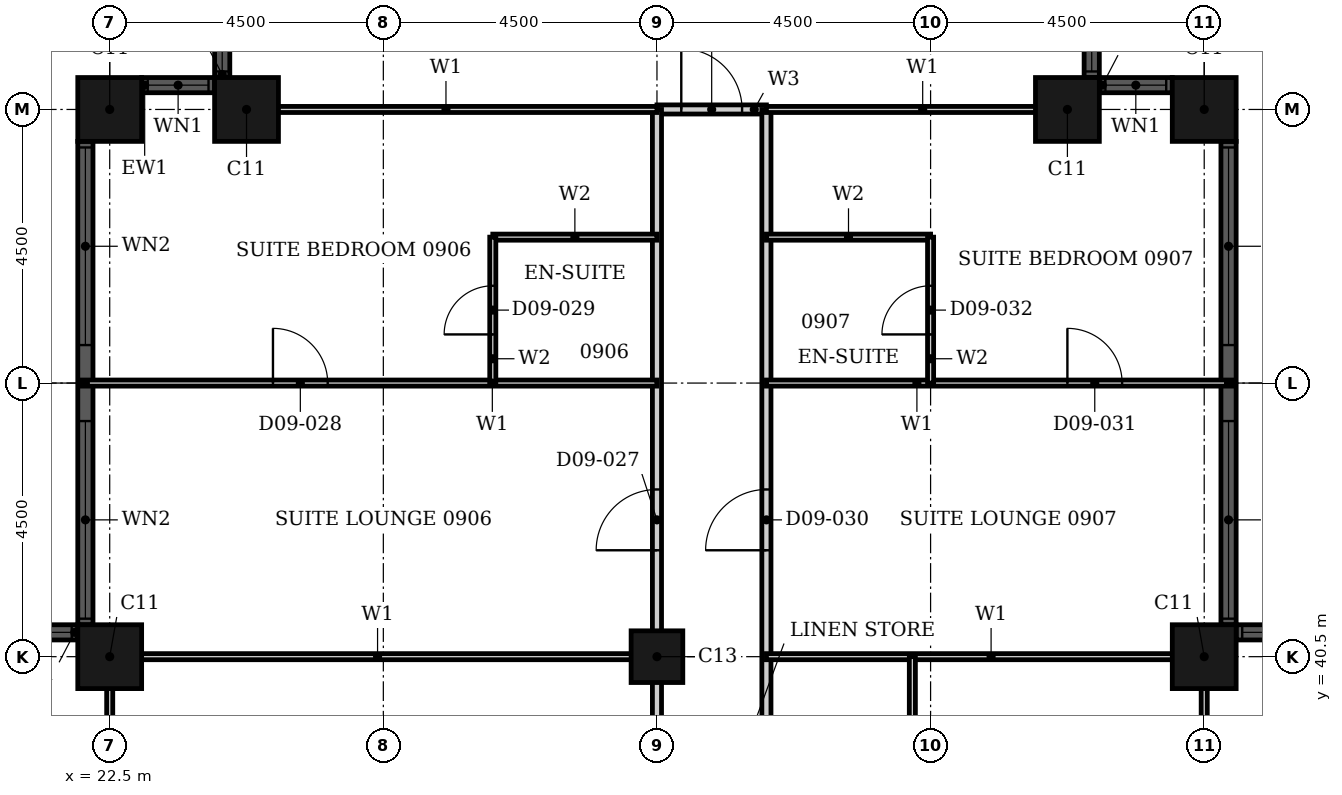
"""IFC4 building model, lengths in metres.
Left out: names, types, materials, properties, quantities, classifications, styles, units other than length and angle.
Written with IfcOpenShell. Run it as: python <this file> out.ifc"""

import sys

from ifc_helpers import new_model, si_unit, direction, frame, frame_2d, origin, origin_2d, place, context, subcontext, project, spatial, rectangle, hollow_rectangle, extrude, element, fill, save


model = new_model("IFC4")
c1 = context("Model", 3, precision=1e-05, world=origin(), true_north=direction((0.0, 1.0)))
c2 = subcontext(c1, "Body", "Model", "MODEL_VIEW")
j1 = project(units=[si_unit("LENGTHUNIT", "METRE"), si_unit("PLANEANGLEUNIT", "RADIAN")], contexts=[c1])
p1 = place(None, origin())
s1 = spatial("IfcSite", under=j1, at=p1, CompositionType="ELEMENT")
p2 = place(p1, origin())
s2 = spatial("IfcBuilding", under=s1, at=p2, CompositionType="ELEMENT")
p3 = place(p2, frame((0.0, 0.0, 44.4)))
s3 = spatial("IfcBuildingStorey", under=s2, at=p3, CompositionType="ELEMENT", Elevation=44.4)
for number, where, z_axis, x_axis in (
    (1, (40.5, 40.5, 0.0), (0.0, 0.0, 1.0), (1.0, 0.0, 0.0)),
    (2, (40.5, 49.5, 0.0), (0.0, 0.0, 1.0), (1.0, 0.0, 0.0)),
    (3, (38.25, 49.5, 0.0), (0.0, 0.0, 1.0), (1.0, 0.0, 0.0)),
    (4, (24.75, 49.5, 0.0), (0.0, 0.0, 1.0), (1.0, 0.0, 0.0)),
    (5, (22.5, 49.5, 0.0), (0.0, 0.0, 1.0), (1.0, 0.0, 0.0)),
    (6, (22.5, 40.5, 0.0), (0.0, 0.0, 1.0), (1.0, 0.0, 0.0)),
):
    element("IfcColumn", number, at=place(p3, frame(where, z_axis=z_axis, x_axis=x_axis)), inside=s3, PredefinedType="COLUMN", context=c2, shape_type="SweptSolid", body=[
        extrude(hollow_rectangle(XDim=1.05, YDim=1.05, WallThickness=0.034, at=origin_2d()), origin(), (0.0, 0.0, 1.0), 3.6),
    ])
p4 = place(p3, frame((31.5, 40.5, 0.0), z_axis=(0.0, 0.0, 1.0), x_axis=(1.0, 0.0, 0.0)))
e7 = element("IfcColumn", 7, at=p4, inside=s3, PredefinedType="COLUMN", context=c2, shape_type="SweptSolid", body=[
    extrude(hollow_rectangle(XDim=0.85, YDim=0.85, WallThickness=0.026, at=origin_2d()), origin(), (0.0, 0.0, 1.0), 3.6),
])
p5 = place(p3, frame((44.475, 40.9, 0.0), z_axis=(0.0, 0.0, 1.0), x_axis=(-1.0, 0.0, 0.0)))
e8 = element("IfcWall", 8, at=p5, inside=s3, PredefinedType="SOLIDWALL", context=c2, shape_type="SweptSolid", body=[
    extrude(rectangle(XDim=3.45, YDim=0.25, at=frame_2d((1.725, 0.0))), origin(), (0.0, 0.0, 1.0), 3.6),
])
p6 = place(p5, frame((0.1, 0.0, 0.9)))
e9 = element("IfcOpeningElement", 9, at=p6, cuts=e8, PredefinedType="OPENING", context=c2, shape_type="SweptSolid", body=[
    extrude(rectangle(XDim=3.25, YDim=2.08, at=frame_2d((1.625, 1.04))), frame((0.0, 0.135, 0.0), z_axis=(0.0, -1.0, 0.0), x_axis=(1.0, 0.0, 0.0)), (0.0, 0.0, 1.0), 0.27),
])
p7 = place(p3, frame((40.9, 41.025, 0.0), z_axis=(0.0, 0.0, 1.0), x_axis=(0.0, 1.0, 0.0)))
e10 = element("IfcWall", 10, at=p7, inside=s3, PredefinedType="SOLIDWALL", context=c2, shape_type="SweptSolid", body=[
    extrude(rectangle(XDim=7.95, YDim=0.25, at=frame_2d((3.975, 0.0))), origin(), (0.0, 0.0, 1.0), 3.6),
])
p8 = place(p7, frame((0.1, 0.0, 0.9)))
e11 = element("IfcOpeningElement", 11, at=p8, cuts=e10, PredefinedType="OPENING", context=c2, shape_type="SweptSolid", body=[
    extrude(rectangle(XDim=3.25, YDim=2.08, at=frame_2d((1.625, 1.04))), frame((0.0, 0.135, 0.0), z_axis=(0.0, -1.0, 0.0), x_axis=(1.0, 0.0, 0.0)), (0.0, 0.0, 1.0), 0.27),
])
p9 = place(p7, frame((4.6, 0.0, 0.9)))
e12 = element("IfcOpeningElement", 12, at=p9, cuts=e10, PredefinedType="OPENING", context=c2, shape_type="SweptSolid", body=[
    extrude(rectangle(XDim=3.25, YDim=2.08, at=frame_2d((1.625, 1.04))), frame((0.0, 0.135, 0.0), z_axis=(0.0, -1.0, 0.0), x_axis=(1.0, 0.0, 0.0)), (0.0, 0.0, 1.0), 0.27),
])
p10 = place(p3, frame((39.975, 49.9, 0.0), z_axis=(0.0, 0.0, 1.0), x_axis=(-1.0, 0.0, 0.0)))
e13 = element("IfcWall", 13, at=p10, inside=s3, PredefinedType="SOLIDWALL", context=c2, shape_type="SweptSolid", body=[
    extrude(rectangle(XDim=1.2, YDim=0.25, at=frame_2d((0.6, 0.0))), origin(), (0.0, 0.0, 1.0), 3.6),
])
p11 = place(p10, frame((0.1, 0.0, 0.9)))
e14 = element("IfcOpeningElement", 14, at=p11, cuts=e13, PredefinedType="OPENING", context=c2, shape_type="SweptSolid", body=[
    extrude(rectangle(XDim=1.0, YDim=2.08, at=frame_2d((0.5, 1.04))), frame((0.0, 0.135, 0.0), z_axis=(0.0, -1.0, 0.0), x_axis=(1.0, 0.0, 0.0)), (0.0, 0.0, 1.0), 0.27),
])
p12 = place(p3, frame((38.65, 50.025, 0.0), z_axis=(0.0, 0.0, 1.0), x_axis=(0.0, 1.0, 0.0)))
e15 = element("IfcWall", 15, at=p12, inside=s3, PredefinedType="SOLIDWALL", context=c2, shape_type="SweptSolid", body=[
    extrude(rectangle(XDim=1.2, YDim=0.25, at=frame_2d((0.6, 0.0))), origin(), (0.0, 0.0, 1.0), 3.6),
])
p13 = place(p12, frame((0.1, 0.0, 0.9)))
e16 = element("IfcOpeningElement", 16, at=p13, cuts=e15, PredefinedType="OPENING", context=c2, shape_type="SweptSolid", body=[
    extrude(rectangle(XDim=1.0, YDim=2.08, at=frame_2d((0.5, 1.04))), frame((0.0, 0.135, 0.0), z_axis=(0.0, -1.0, 0.0), x_axis=(1.0, 0.0, 0.0)), (0.0, 0.0, 1.0), 0.27),
])
p14 = place(p3, frame((24.35, 51.225, 0.0), z_axis=(0.0, 0.0, 1.0), x_axis=(0.0, -1.0, 0.0)))
e17 = element("IfcWall", 17, at=p14, inside=s3, PredefinedType="SOLIDWALL", context=c2, shape_type="SweptSolid", body=[
    extrude(rectangle(XDim=1.2, YDim=0.25, at=frame_2d((0.6, 0.0))), origin(), (0.0, 0.0, 1.0), 3.6),
])
p15 = place(p14, frame((0.1, 0.0, 0.9)))
e18 = element("IfcOpeningElement", 18, at=p15, cuts=e17, PredefinedType="OPENING", context=c2, shape_type="SweptSolid", body=[
    extrude(rectangle(XDim=1.0, YDim=2.08, at=frame_2d((0.5, 1.04))), frame((0.0, 0.135, 0.0), z_axis=(0.0, -1.0, 0.0), x_axis=(1.0, 0.0, 0.0)), (0.0, 0.0, 1.0), 0.27),
])
p16 = place(p3, frame((24.225, 49.9, 0.0), z_axis=(0.0, 0.0, 1.0), x_axis=(-1.0, 0.0, 0.0)))
e19 = element("IfcWall", 19, at=p16, inside=s3, PredefinedType="SOLIDWALL", context=c2, shape_type="SweptSolid", body=[
    extrude(rectangle(XDim=1.2, YDim=0.25, at=frame_2d((0.6, 0.0))), origin(), (0.0, 0.0, 1.0), 3.6),
])
p17 = place(p16, frame((0.1, 0.0, 0.9)))
e20 = element("IfcOpeningElement", 20, at=p17, cuts=e19, PredefinedType="OPENING", context=c2, shape_type="SweptSolid", body=[
    extrude(rectangle(XDim=1.0, YDim=2.08, at=frame_2d((0.5, 1.04))), frame((0.0, 0.135, 0.0), z_axis=(0.0, -1.0, 0.0), x_axis=(1.0, 0.0, 0.0)), (0.0, 0.0, 1.0), 0.27),
])
p18 = place(p3, frame((22.1, 48.975, 0.0), z_axis=(0.0, 0.0, 1.0), x_axis=(0.0, -1.0, 0.0)))
e21 = element("IfcWall", 21, at=p18, inside=s3, PredefinedType="SOLIDWALL", context=c2, shape_type="SweptSolid", body=[
    extrude(rectangle(XDim=7.95, YDim=0.25, at=frame_2d((3.975, 0.0))), origin(), (0.0, 0.0, 1.0), 3.6),
])
p19 = place(p18, frame((0.1, 0.0, 0.9)))
e22 = element("IfcOpeningElement", 22, at=p19, cuts=e21, PredefinedType="OPENING", context=c2, shape_type="SweptSolid", body=[
    extrude(rectangle(XDim=3.25, YDim=2.08, at=frame_2d((1.625, 1.04))), frame((0.0, 0.135, 0.0), z_axis=(0.0, -1.0, 0.0), x_axis=(1.0, 0.0, 0.0)), (0.0, 0.0, 1.0), 0.27),
])
p20 = place(p18, frame((4.6, 0.0, 0.9)))
e23 = element("IfcOpeningElement", 23, at=p20, cuts=e21, PredefinedType="OPENING", context=c2, shape_type="SweptSolid", body=[
    extrude(rectangle(XDim=3.25, YDim=2.08, at=frame_2d((1.625, 1.04))), frame((0.0, 0.135, 0.0), z_axis=(0.0, -1.0, 0.0), x_axis=(1.0, 0.0, 0.0)), (0.0, 0.0, 1.0), 0.27),
])
p21 = place(p3, frame((21.975, 40.9, 0.0), z_axis=(0.0, 0.0, 1.0), x_axis=(-1.0, 0.0, 0.0)))
e24 = element("IfcWall", 24, at=p21, inside=s3, PredefinedType="SOLIDWALL", context=c2, shape_type="SweptSolid", body=[
    extrude(rectangle(XDim=3.45, YDim=0.25, at=frame_2d((1.725, 0.0))), origin(), (0.0, 0.0, 1.0), 3.6),
])
p22 = place(p21, frame((0.1, 0.0, 0.9)))
e25 = element("IfcOpeningElement", 25, at=p22, cuts=e24, PredefinedType="OPENING", context=c2, shape_type="SweptSolid", body=[
    extrude(rectangle(XDim=3.25, YDim=2.08, at=frame_2d((1.625, 1.04))), frame((0.0, 0.135, 0.0), z_axis=(0.0, -1.0, 0.0), x_axis=(1.0, 0.0, 0.0)), (0.0, 0.0, 1.0), 0.27),
])
p23 = place(p3, frame((31.5, 49.5, 0.0), z_axis=(0.0, 0.0, 1.0), x_axis=(1.0, 0.0, 0.0)))
e26 = element("IfcWall", 26, at=p23, inside=s3, PredefinedType="PARTITIONING", context=c2, shape_type="SweptSolid", body=[
    extrude(rectangle(XDim=1.8, YDim=0.15, at=frame_2d((0.9, 0.0))), origin(), (0.0, 0.0, 1.0), 3.2),
])
p24 = place(p23, frame((0.4, 0.0, 0.0)))
e27 = element("IfcOpeningElement", 27, at=p24, cuts=e26, PredefinedType="OPENING", context=c2, shape_type="SweptSolid", body=[
    extrude(rectangle(XDim=1.0, YDim=2.1, at=frame_2d((0.5, 1.05))), frame((0.0, 0.085, 0.0), z_axis=(0.0, -1.0, 0.0), x_axis=(1.0, 0.0, 0.0)), (0.0, 0.0, 1.0), 0.17),
])
p25 = place(p3, frame((31.5, 33.3, 0.0), z_axis=(0.0, 0.0, 1.0), x_axis=(0.0, 1.0, 0.0)))
e28 = element("IfcWall", 28, at=p25, inside=s3, PredefinedType="PARTITIONING", context=c2, shape_type="SweptSolid", body=[
    extrude(rectangle(XDim=16.2, YDim=0.15, at=frame_2d((8.1, 0.0))), origin(), (0.0, 0.0, 1.0), 2.48),
])
p26 = place(p25, frame((8.95, 0.0, 0.0)))
e29 = element("IfcOpeningElement", 29, at=p26, cuts=e28, PredefinedType="OPENING", context=c2, shape_type="SweptSolid", body=[
    extrude(rectangle(XDim=1.0, YDim=2.1, at=frame_2d((0.5, 1.05))), frame((0.0, 0.085, 0.0), z_axis=(0.0, -1.0, 0.0), x_axis=(1.0, 0.0, 0.0)), (0.0, 0.0, 1.0), 0.17),
])
p27 = place(p3, frame((33.3, 33.3, 0.0), z_axis=(0.0, 0.0, 1.0), x_axis=(0.0, 1.0, 0.0)))
e30 = element("IfcWall", 30, at=p27, inside=s3, PredefinedType="PARTITIONING", context=c2, shape_type="SweptSolid", body=[
    extrude(rectangle(XDim=16.2, YDim=0.15, at=frame_2d((8.1, 0.0))), origin(), (0.0, 0.0, 1.0), 3.2),
])
p28 = place(p27, frame((8.95, 0.0, 0.0)))
e31 = element("IfcOpeningElement", 31, at=p28, cuts=e30, PredefinedType="OPENING", context=c2, shape_type="SweptSolid", body=[
    extrude(rectangle(XDim=1.0, YDim=2.1, at=frame_2d((0.5, 1.05))), frame((0.0, 0.085, 0.0), z_axis=(0.0, -1.0, 0.0), x_axis=(1.0, 0.0, 0.0)), (0.0, 0.0, 1.0), 0.17),
])
p29 = place(p3, frame((33.3, 40.5, 0.0), z_axis=(0.0, 0.0, 1.0), x_axis=(1.0, 0.0, 0.0)))
e32 = element("IfcWall", 32, at=p29, inside=s3, PredefinedType="PARTITIONING", context=c2, shape_type="SweptSolid", body=[
    extrude(rectangle(XDim=7.39, YDim=0.1, at=frame_2d((3.695, 0.0))), origin(), (0.0, 0.0, 1.0), 2.28),
])
p30 = place(p3, frame((22.31, 40.5, 0.0), z_axis=(0.0, 0.0, 1.0), x_axis=(1.0, 0.0, 0.0)))
e33 = element("IfcWall", 33, at=p30, inside=s3, PredefinedType="PARTITIONING", context=c2, shape_type="SweptSolid", body=[
    extrude(rectangle(XDim=9.19, YDim=0.1, at=frame_2d((4.595, 0.0))), origin(), (0.0, 0.0, 1.0), 2.28),
])
p31 = place(p3, frame((33.3, 45.0, 0.0), z_axis=(0.0, 0.0, 1.0), x_axis=(1.0, 0.0, 0.0)))
e34 = element("IfcWall", 34, at=p31, inside=s3, PredefinedType="PARTITIONING", context=c2, shape_type="SweptSolid", body=[
    extrude(rectangle(XDim=7.665, YDim=0.1, at=frame_2d((3.833, 0.0))), origin(), (0.0, 0.0, 1.0), 3.2),
])
p32 = place(p31, frame((4.95, 0.0, 0.0)))
e35 = element("IfcOpeningElement", 35, at=p32, cuts=e34, PredefinedType="OPENING", context=c2, shape_type="SweptSolid", body=[
    extrude(rectangle(XDim=0.9, YDim=2.1, at=frame_2d((0.45, 1.05))), frame((0.0, 0.06, 0.0), z_axis=(0.0, -1.0, 0.0), x_axis=(1.0, 0.0, 0.0)), (0.0, 0.0, 1.0), 0.12),
])
p33 = place(p3, frame((22.035, 45.0, 0.0), z_axis=(0.0, 0.0, 1.0), x_axis=(1.0, 0.0, 0.0)))
e36 = element("IfcWall", 36, at=p33, inside=s3, PredefinedType="PARTITIONING", context=c2, shape_type="SweptSolid", body=[
    extrude(rectangle(XDim=9.465, YDim=0.1, at=frame_2d((4.732, 0.0))), origin(), (0.0, 0.0, 1.0), 3.2),
])
p34 = place(p33, frame((3.15, 0.0, 0.0)))
e37 = element("IfcOpeningElement", 37, at=p34, cuts=e36, PredefinedType="OPENING", context=c2, shape_type="SweptSolid", body=[
    extrude(rectangle(XDim=0.9, YDim=2.1, at=frame_2d((0.45, 1.05))), frame((0.0, 0.06, 0.0), z_axis=(0.0, -1.0, 0.0), x_axis=(1.0, 0.0, 0.0)), (0.0, 0.0, 1.0), 0.12),
])
p35 = place(p3, frame((33.3, 49.5, 0.0), z_axis=(0.0, 0.0, 1.0), x_axis=(1.0, 0.0, 0.0)))
e38 = element("IfcWall", 38, at=p35, inside=s3, PredefinedType="PARTITIONING", context=c2, shape_type="SweptSolid", body=[
    extrude(rectangle(XDim=5.14, YDim=0.1, at=frame_2d((2.57, 0.0))), origin(), (0.0, 0.0, 1.0), 3.2),
])
p36 = place(p3, frame((24.56, 49.5, 0.0), z_axis=(0.0, 0.0, 1.0), x_axis=(1.0, 0.0, 0.0)))
e39 = element("IfcWall", 39, at=p36, inside=s3, PredefinedType="PARTITIONING", context=c2, shape_type="SweptSolid", body=[
    extrude(rectangle(XDim=6.94, YDim=0.1, at=frame_2d((3.47, 0.0))), origin(), (0.0, 0.0, 1.0), 3.2),
])
p37 = place(p3, frame((22.5, 33.3, 0.0), z_axis=(0.0, 0.0, 1.0), x_axis=(0.0, 1.0, 0.0)))
e40 = element("IfcWall", 40, at=p37, inside=s3, PredefinedType="PARTITIONING", context=c2, shape_type="SweptSolid", body=[
    extrude(rectangle(XDim=7.39, YDim=0.1, at=frame_2d((3.695, 0.0))), origin(), (0.0, 0.0, 1.0), 3.2),
])
p38 = place(p3, frame((35.7, 33.3, 0.0), z_axis=(0.0, 0.0, 1.0), x_axis=(0.0, 1.0, 0.0)))
e41 = element("IfcWall", 41, at=p38, inside=s3, PredefinedType="PARTITIONING", context=c2, shape_type="SweptSolid", body=[
    extrude(rectangle(XDim=7.2, YDim=0.1, at=frame_2d((3.6, 0.0))), origin(), (0.0, 0.0, 1.0), 3.2),
])
p39 = place(p3, frame((40.5, 33.3, 0.0), z_axis=(0.0, 0.0, 1.0), x_axis=(0.0, 1.0, 0.0)))
e42 = element("IfcWall", 42, at=p39, inside=s3, PredefinedType="PARTITIONING", context=c2, shape_type="SweptSolid", body=[
    extrude(rectangle(XDim=7.39, YDim=0.1, at=frame_2d((3.695, 0.0))), origin(), (0.0, 0.0, 1.0), 3.2),
])
for number, where, z_axis, x_axis in (
    (43, (33.3, 47.4, 0.0), (0.0, 0.0, 1.0), (1.0, 0.0, 0.0)),
    (44, (28.8, 47.4, 0.0), (0.0, 0.0, 1.0), (1.0, 0.0, 0.0)),
):
    element("IfcWall", number, at=place(p3, frame(where, z_axis=z_axis, x_axis=x_axis)), inside=s3, PredefinedType="PARTITIONING", context=c2, shape_type="SweptSolid", body=[
        extrude(rectangle(XDim=2.7, YDim=0.1, at=frame_2d((1.35, 0.0))), origin(), (0.0, 0.0, 1.0), 3.2),
    ])
p40 = place(p3, frame((28.8, 45.0, 0.0), z_axis=(0.0, 0.0, 1.0), x_axis=(0.0, 1.0, 0.0)))
e45 = element("IfcWall", 45, at=p40, inside=s3, PredefinedType="PARTITIONING", context=c2, shape_type="SweptSolid", body=[
    extrude(rectangle(XDim=2.4, YDim=0.1, at=frame_2d((1.2, 0.0))), origin(), (0.0, 0.0, 1.0), 3.2),
])
p41 = place(p40, frame((0.8, 0.0, 0.0)))
e46 = element("IfcOpeningElement", 46, at=p41, cuts=e45, PredefinedType="OPENING", context=c2, shape_type="SweptSolid", body=[
    extrude(rectangle(XDim=0.8, YDim=2.1, at=frame_2d((0.4, 1.05))), frame((0.0, 0.06, 0.0), z_axis=(0.0, -1.0, 0.0), x_axis=(1.0, 0.0, 0.0)), (0.0, 0.0, 1.0), 0.12),
])
p42 = place(p3, frame((36.0, 45.0, 0.0), z_axis=(0.0, 0.0, 1.0), x_axis=(0.0, 1.0, 0.0)))
e47 = element("IfcWall", 47, at=p42, inside=s3, PredefinedType="PARTITIONING", context=c2, shape_type="SweptSolid", body=[
    extrude(rectangle(XDim=2.4, YDim=0.1, at=frame_2d((1.2, 0.0))), origin(), (0.0, 0.0, 1.0), 2.48),
])
p43 = place(p42, frame((0.8, 0.0, 0.0)))
e48 = element("IfcOpeningElement", 48, at=p43, cuts=e47, PredefinedType="OPENING", context=c2, shape_type="SweptSolid", body=[
    extrude(rectangle(XDim=0.8, YDim=2.1, at=frame_2d((0.4, 1.05))), frame((0.0, 0.06, 0.0), z_axis=(0.0, -1.0, 0.0), x_axis=(1.0, 0.0, 0.0)), (0.0, 0.0, 1.0), 0.12),
])
p44 = place(p6, origin())
e49 = element("IfcWindow", 49, at=p44, inside=s3, PartitioningType="SINGLE_PANEL", PredefinedType="WINDOW", context=c2, shape_type="SweptSolid", body=[
    extrude(rectangle(XDim=3.25, YDim=2.08, at=frame_2d((1.625, 1.04))), frame((0.0, 0.03, 0.0), z_axis=(0.0, -1.0, 0.0), x_axis=(1.0, 0.0, 0.0)), (0.0, 0.0, 1.0), 0.06),
])
fill(e9, e49)
p45 = place(p8, origin())
e50 = element("IfcWindow", 50, at=p45, inside=s3, PartitioningType="SINGLE_PANEL", PredefinedType="WINDOW", context=c2, shape_type="SweptSolid", body=[
    extrude(rectangle(XDim=3.25, YDim=2.08, at=frame_2d((1.625, 1.04))), frame((0.0, 0.03, 0.0), z_axis=(0.0, -1.0, 0.0), x_axis=(1.0, 0.0, 0.0)), (0.0, 0.0, 1.0), 0.06),
])
fill(e11, e50)
p46 = place(p9, origin())
e51 = element("IfcWindow", 51, at=p46, inside=s3, PartitioningType="SINGLE_PANEL", PredefinedType="WINDOW", context=c2, shape_type="SweptSolid", body=[
    extrude(rectangle(XDim=3.25, YDim=2.08, at=frame_2d((1.625, 1.04))), frame((0.0, 0.03, 0.0), z_axis=(0.0, -1.0, 0.0), x_axis=(1.0, 0.0, 0.0)), (0.0, 0.0, 1.0), 0.06),
])
fill(e12, e51)
p47 = place(p11, origin())
e52 = element("IfcWindow", 52, at=p47, inside=s3, PartitioningType="SINGLE_PANEL", PredefinedType="WINDOW", context=c2, shape_type="SweptSolid", body=[
    extrude(rectangle(XDim=1.0, YDim=2.08, at=frame_2d((0.5, 1.04))), frame((0.0, 0.03, 0.0), z_axis=(0.0, -1.0, 0.0), x_axis=(1.0, 0.0, 0.0)), (0.0, 0.0, 1.0), 0.06),
])
fill(e14, e52)
p48 = place(p13, origin())
e53 = element("IfcWindow", 53, at=p48, inside=s3, PartitioningType="SINGLE_PANEL", PredefinedType="WINDOW", context=c2, shape_type="SweptSolid", body=[
    extrude(rectangle(XDim=1.0, YDim=2.08, at=frame_2d((0.5, 1.04))), frame((0.0, 0.03, 0.0), z_axis=(0.0, -1.0, 0.0), x_axis=(1.0, 0.0, 0.0)), (0.0, 0.0, 1.0), 0.06),
])
fill(e16, e53)
p49 = place(p15, origin())
e54 = element("IfcWindow", 54, at=p49, inside=s3, PartitioningType="SINGLE_PANEL", PredefinedType="WINDOW", context=c2, shape_type="SweptSolid", body=[
    extrude(rectangle(XDim=1.0, YDim=2.08, at=frame_2d((0.5, 1.04))), frame((0.0, 0.03, 0.0), z_axis=(0.0, -1.0, 0.0), x_axis=(1.0, 0.0, 0.0)), (0.0, 0.0, 1.0), 0.06),
])
fill(e18, e54)
p50 = place(p17, origin())
e55 = element("IfcWindow", 55, at=p50, inside=s3, PartitioningType="SINGLE_PANEL", PredefinedType="WINDOW", context=c2, shape_type="SweptSolid", body=[
    extrude(rectangle(XDim=1.0, YDim=2.08, at=frame_2d((0.5, 1.04))), frame((0.0, 0.03, 0.0), z_axis=(0.0, -1.0, 0.0), x_axis=(1.0, 0.0, 0.0)), (0.0, 0.0, 1.0), 0.06),
])
fill(e20, e55)
p51 = place(p19, origin())
e56 = element("IfcWindow", 56, at=p51, inside=s3, PartitioningType="SINGLE_PANEL", PredefinedType="WINDOW", context=c2, shape_type="SweptSolid", body=[
    extrude(rectangle(XDim=3.25, YDim=2.08, at=frame_2d((1.625, 1.04))), frame((0.0, 0.03, 0.0), z_axis=(0.0, -1.0, 0.0), x_axis=(1.0, 0.0, 0.0)), (0.0, 0.0, 1.0), 0.06),
])
fill(e22, e56)
p52 = place(p20, origin())
e57 = element("IfcWindow", 57, at=p52, inside=s3, PartitioningType="SINGLE_PANEL", PredefinedType="WINDOW", context=c2, shape_type="SweptSolid", body=[
    extrude(rectangle(XDim=3.25, YDim=2.08, at=frame_2d((1.625, 1.04))), frame((0.0, 0.03, 0.0), z_axis=(0.0, -1.0, 0.0), x_axis=(1.0, 0.0, 0.0)), (0.0, 0.0, 1.0), 0.06),
])
fill(e23, e57)
p53 = place(p22, origin())
e58 = element("IfcWindow", 58, at=p53, inside=s3, PartitioningType="SINGLE_PANEL", PredefinedType="WINDOW", context=c2, shape_type="SweptSolid", body=[
    extrude(rectangle(XDim=3.25, YDim=2.08, at=frame_2d((1.625, 1.04))), frame((0.0, 0.03, 0.0), z_axis=(0.0, -1.0, 0.0), x_axis=(1.0, 0.0, 0.0)), (0.0, 0.0, 1.0), 0.06),
])
fill(e25, e58)
p54 = place(p26, origin())
e59 = element("IfcDoor", 59, at=p54, inside=s3, OperationType="SINGLE_SWING_LEFT", PredefinedType="DOOR", context=c2, shape_type="SweptSolid", body=[
    extrude(rectangle(XDim=1.0, YDim=2.1, at=frame_2d((0.5, 1.05))), frame((0.0, 0.025, 0.0), z_axis=(0.0, -1.0, 0.0), x_axis=(1.0, 0.0, 0.0)), (0.0, 0.0, 1.0), 0.05),
])
fill(e29, e59)
p55 = place(p34, origin())
e60 = element("IfcDoor", 60, at=p55, inside=s3, OperationType="SINGLE_SWING_LEFT", PredefinedType="DOOR", context=c2, shape_type="SweptSolid", body=[
    extrude(rectangle(XDim=0.9, YDim=2.1, at=frame_2d((0.45, 1.05))), frame((0.0, 0.025, 0.0), z_axis=(0.0, -1.0, 0.0), x_axis=(1.0, 0.0, 0.0)), (0.0, 0.0, 1.0), 0.05),
])
fill(e37, e60)
p56 = place(p41, origin())
e61 = element("IfcDoor", 61, at=p56, inside=s3, OperationType="SINGLE_SWING_LEFT", PredefinedType="DOOR", context=c2, shape_type="SweptSolid", body=[
    extrude(rectangle(XDim=0.8, YDim=2.1, at=frame_2d((0.4, 1.05))), frame((0.0, 0.025, 0.0), z_axis=(0.0, -1.0, 0.0), x_axis=(1.0, 0.0, 0.0)), (0.0, 0.0, 1.0), 0.05),
])
fill(e46, e61)
p57 = place(p28, origin())
e62 = element("IfcDoor", 62, at=p57, inside=s3, OperationType="SINGLE_SWING_RIGHT", PredefinedType="DOOR", context=c2, shape_type="SweptSolid", body=[
    extrude(rectangle(XDim=1.0, YDim=2.1, at=frame_2d((0.5, 1.05))), frame((0.0, 0.025, 0.0), z_axis=(0.0, -1.0, 0.0), x_axis=(1.0, 0.0, 0.0)), (0.0, 0.0, 1.0), 0.05),
])
fill(e31, e62)
p58 = place(p32, origin())
e63 = element("IfcDoor", 63, at=p58, inside=s3, OperationType="SINGLE_SWING_RIGHT", PredefinedType="DOOR", context=c2, shape_type="SweptSolid", body=[
    extrude(rectangle(XDim=0.9, YDim=2.1, at=frame_2d((0.45, 1.05))), frame((0.0, 0.025, 0.0), z_axis=(0.0, -1.0, 0.0), x_axis=(1.0, 0.0, 0.0)), (0.0, 0.0, 1.0), 0.05),
])
fill(e35, e63)
p59 = place(p43, origin())
e64 = element("IfcDoor", 64, at=p59, inside=s3, OperationType="SINGLE_SWING_LEFT", PredefinedType="DOOR", context=c2, shape_type="SweptSolid", body=[
    extrude(rectangle(XDim=0.8, YDim=2.1, at=frame_2d((0.4, 1.05))), frame((0.0, 0.025, 0.0), z_axis=(0.0, -1.0, 0.0), x_axis=(1.0, 0.0, 0.0)), (0.0, 0.0, 1.0), 0.05),
])
fill(e48, e64)
p60 = place(p24, origin())
e65 = element("IfcDoor", 65, at=p60, inside=s3, OperationType="SINGLE_SWING_RIGHT", PredefinedType="DOOR", context=c2, shape_type="SweptSolid", body=[
    extrude(rectangle(XDim=1.0, YDim=2.1, at=frame_2d((0.5, 1.05))), frame((0.0, 0.025, 0.0), z_axis=(0.0, -1.0, 0.0), x_axis=(1.0, 0.0, 0.0)), (0.0, 0.0, 1.0), 0.05),
])
fill(e27, e65)
save(model, sys.argv[1])
